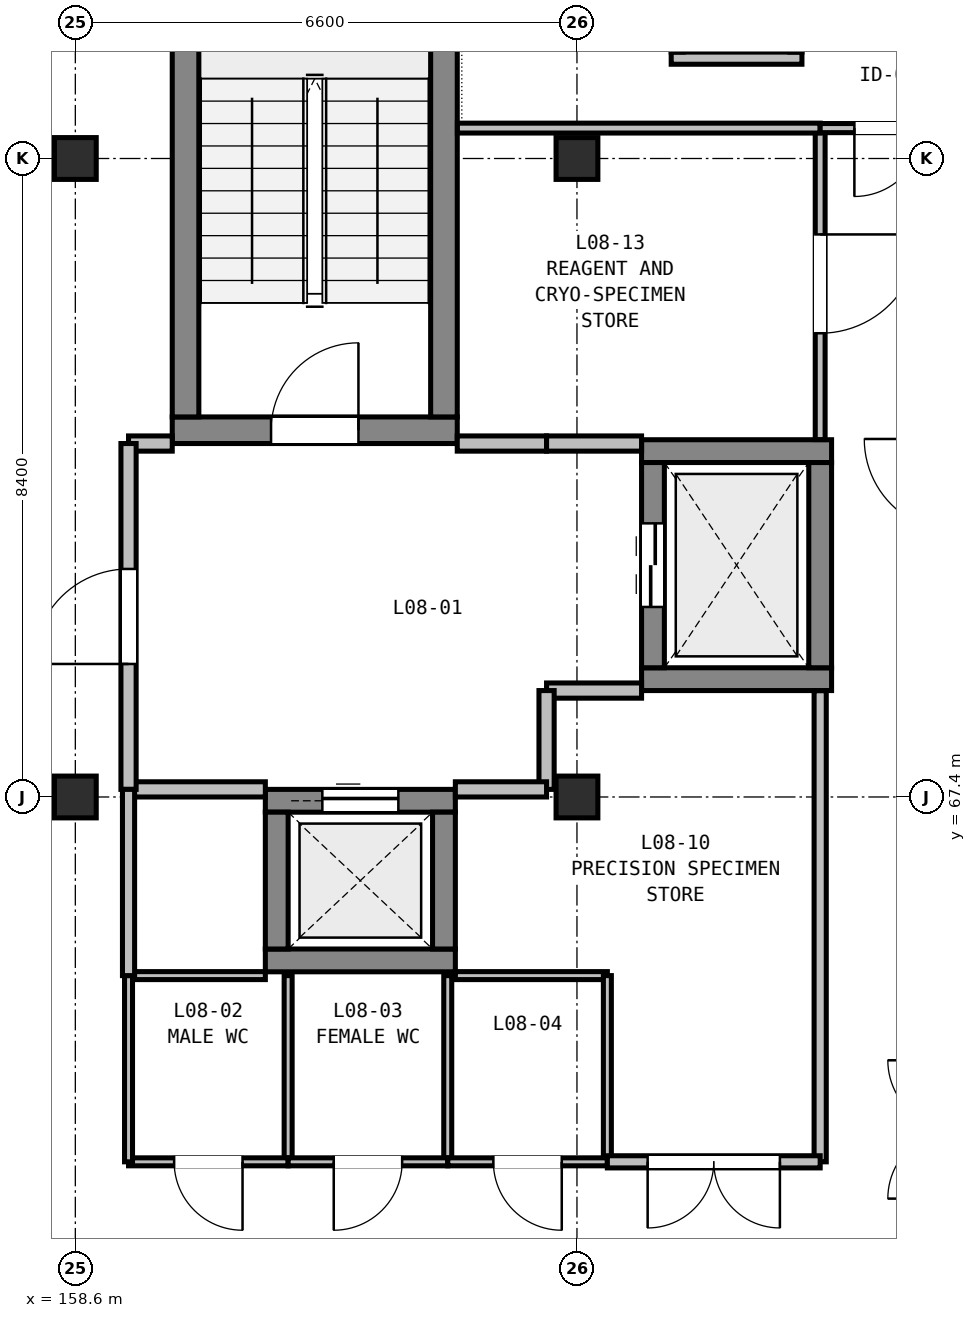
"""IFC4 building model, lengths in metres.
Left out: names, types, materials, properties, quantities, classifications, styles, units other than length and angle.
Written with IfcOpenShell. Run it as: python <this file> out.ifc"""

import sys

from ifc_helpers import new_model, si_unit, direction, frame, frame_2d, origin, origin_2d, place, context, subcontext, project, spatial, rectangle, extrude, element, fill, save


model = new_model("IFC4")
c1 = context("Model", 3, precision=1e-05, world=origin(), true_north=direction((0.0, 1.0)))
c2 = subcontext(c1, "Body", "Model", "MODEL_VIEW")
j1 = project(units=[si_unit("LENGTHUNIT", "METRE"), si_unit("PLANEANGLEUNIT", "RADIAN")], contexts=[c1])
p1 = place(None, origin())
s1 = spatial("IfcSite", under=j1, at=p1, CompositionType="ELEMENT")
p2 = place(p1, origin())
s2 = spatial("IfcBuilding", under=s1, at=p2, CompositionType="ELEMENT")
p3 = place(p2, frame((0.0, 0.0, 36.6)))
s3 = spatial("IfcBuildingStorey", under=s2, at=p3, CompositionType="ELEMENT", Elevation=36.6)
for number, where, z_axis, x_axis in (
    (1, (158.6, 67.4, 0.0), (0.0, 0.0, 1.0), (1.0, 0.0, 0.0)),
    (2, (158.6, 75.8, 0.0), (0.0, 0.0, 1.0), (1.0, 0.0, 0.0)),
    (3, (165.2, 67.4, 0.0), (0.0, 0.0, 1.0), (1.0, 0.0, 0.0)),
    (4, (165.2, 75.8, 0.0), (0.0, 0.0, 1.0), (1.0, 0.0, 0.0)),
):
    element("IfcColumn", number, at=place(p3, frame(where, z_axis=z_axis, x_axis=x_axis)), inside=s3, PredefinedType="COLUMN", context=c2, shape_type="SweptSolid", body=[
        extrude(rectangle(XDim=0.55, YDim=0.55, at=origin_2d()), origin(), (0.0, 0.0, 1.0), 3.9),
    ])
p4 = place(p3, frame((159.875, 72.225, 0.0), z_axis=(0.0, 0.0, 1.0), x_axis=(1.0, 0.0, 0.0)))
e5 = element("IfcWall", 5, at=p4, inside=s3, PredefinedType="SHEAR", context=c2, shape_type="SweptSolid", body=[
    extrude(rectangle(XDim=3.75, YDim=0.35, at=frame_2d((1.875, 0.0))), origin(), (0.0, 0.0, 1.0), 3.9),
])
p5 = place(p4, frame((1.3, 0.0, 0.0)))
e6 = element("IfcOpeningElement", 6, at=p5, cuts=e5, PredefinedType="OPENING", context=c2, shape_type="SweptSolid", body=[
    extrude(rectangle(XDim=1.15, YDim=2.15, at=frame_2d((0.575, 1.075))), frame((0.0, 0.185, 0.0), z_axis=(0.0, -1.0, 0.0), x_axis=(1.0, 0.0, 0.0)), (0.0, 0.0, 1.0), 0.37),
])
for number, where, z_axis, x_axis in (
    (7, (160.05, 72.4, 0.0), (0.0, 0.0, 1.0), (0.0, 1.0, 0.0)),
    (8, (163.45, 72.4, 0.0), (0.0, 0.0, 1.0), (0.0, 1.0, 0.0)),
):
    element("IfcWall", number, at=place(p3, frame(where, z_axis=z_axis, x_axis=x_axis)), inside=s3, PredefinedType="SHEAR", context=c2, shape_type="SweptSolid", body=[
        extrude(rectangle(XDim=7.375, YDim=0.35, at=frame_2d((3.688, 0.0))), origin(), (0.0, 0.0, 1.0), 3.9),
    ])
for number, where, z_axis, x_axis in (
    (9, (166.05, 68.95, 0.0), (0.0, 0.0, 1.0), (1.0, 0.0, 0.0)),
    (10, (166.05, 71.95, 0.0), (0.0, 0.0, 1.0), (1.0, 0.0, 0.0)),
):
    element("IfcWall", number, at=place(p3, frame(where, z_axis=z_axis, x_axis=x_axis)), inside=s3, PredefinedType="SHEAR", context=c2, shape_type="SweptSolid", body=[
        extrude(rectangle(XDim=2.5, YDim=0.3, at=frame_2d((1.25, 0.0))), origin(), (0.0, 0.0, 1.0), 3.9),
    ])
p6 = place(p3, frame((166.2, 69.1, 0.0), z_axis=(0.0, 0.0, 1.0), x_axis=(0.0, 1.0, 0.0)))
e11 = element("IfcWall", 11, at=p6, inside=s3, PredefinedType="SHEAR", context=c2, shape_type="SweptSolid", body=[
    extrude(rectangle(XDim=2.7, YDim=0.3, at=frame_2d((1.35, 0.0))), origin(), (0.0, 0.0, 1.0), 3.9),
])
p7 = place(p6, frame((0.8, 0.0, 0.0)))
e12 = element("IfcOpeningElement", 12, at=p7, cuts=e11, PredefinedType="OPENING", context=c2, shape_type="SweptSolid", body=[
    extrude(rectangle(XDim=1.1, YDim=2.1, at=frame_2d((0.55, 1.05))), frame((0.0, 0.16, 0.0), z_axis=(0.0, -1.0, 0.0), x_axis=(1.0, 0.0, 0.0)), (0.0, 0.0, 1.0), 0.32),
])
p8 = place(p3, frame((168.4, 69.1, 0.0), z_axis=(0.0, 0.0, 1.0), x_axis=(0.0, 1.0, 0.0)))
e13 = element("IfcWall", 13, at=p8, inside=s3, PredefinedType="SHEAR", context=c2, shape_type="SweptSolid", body=[
    extrude(rectangle(XDim=2.7, YDim=0.3, at=frame_2d((1.35, 0.0))), origin(), (0.0, 0.0, 1.0), 3.9),
])
p9 = place(p3, frame((161.1, 65.25, 0.0), z_axis=(0.0, 0.0, 1.0), x_axis=(1.0, 0.0, 0.0)))
e14 = element("IfcWall", 14, at=p9, inside=s3, PredefinedType="SHEAR", context=c2, shape_type="SweptSolid", body=[
    extrude(rectangle(XDim=2.5, YDim=0.3, at=frame_2d((1.25, 0.0))), origin(), (0.0, 0.0, 1.0), 3.9),
])
p10 = place(p3, frame((161.1, 67.35, 0.0), z_axis=(0.0, 0.0, 1.0), x_axis=(1.0, 0.0, 0.0)))
e15 = element("IfcWall", 15, at=p10, inside=s3, PredefinedType="SHEAR", context=c2, shape_type="SweptSolid", body=[
    extrude(rectangle(XDim=2.5, YDim=0.3, at=frame_2d((1.25, 0.0))), origin(), (0.0, 0.0, 1.0), 3.9),
])
p11 = place(p10, frame((0.75, 0.0, 0.0)))
e16 = element("IfcOpeningElement", 16, at=p11, cuts=e15, PredefinedType="OPENING", context=c2, shape_type="SweptSolid", body=[
    extrude(rectangle(XDim=1.0, YDim=2.1, at=frame_2d((0.5, 1.05))), frame((0.0, 0.16, 0.0), z_axis=(0.0, -1.0, 0.0), x_axis=(1.0, 0.0, 0.0)), (0.0, 0.0, 1.0), 0.32),
])
for number, where, z_axis, x_axis in (
    (17, (161.25, 65.4, 0.0), (0.0, 0.0, 1.0), (0.0, 1.0, 0.0)),
    (18, (163.45, 65.4, 0.0), (0.0, 0.0, 1.0), (0.0, 1.0, 0.0)),
):
    element("IfcWall", number, at=place(p3, frame(where, z_axis=z_axis, x_axis=x_axis)), inside=s3, PredefinedType="SHEAR", context=c2, shape_type="SweptSolid", body=[
        extrude(rectangle(XDim=1.8, YDim=0.3, at=frame_2d((0.9, 0.0))), origin(), (0.0, 0.0, 1.0), 3.9),
    ])
p12 = place(p3, frame((166.44, 77.12, 0.0), z_axis=(0.0, 0.0, 1.0), x_axis=(1.0, 0.0, 0.0)))
e19 = element("IfcWall", 19, at=p12, inside=s3, PredefinedType="PARTITIONING", context=c2, shape_type="SweptSolid", body=[
    extrude(rectangle(XDim=1.72, YDim=0.16, at=frame_2d((0.86, 0.0))), origin(), (0.0, 0.0, 1.0), 3.635),
])
p13 = place(p3, frame((159.3, 72.05, 0.0), z_axis=(0.0, 0.0, 1.0), x_axis=(1.0, 0.0, 0.0)))
e20 = element("IfcWall", 20, at=p13, inside=s3, PredefinedType="PARTITIONING", context=c2, shape_type="SweptSolid", body=[
    extrude(rectangle(XDim=0.575, YDim=0.2, at=frame_2d((0.288, 0.0))), origin(), (0.0, 0.0, 1.0), 3.635),
])
p14 = place(p3, frame((163.625, 72.05, 0.0), z_axis=(0.0, 0.0, 1.0), x_axis=(1.0, 0.0, 0.0)))
e21 = element("IfcWall", 21, at=p14, inside=s3, PredefinedType="PARTITIONING", context=c2, shape_type="SweptSolid", body=[
    extrude(rectangle(XDim=1.175, YDim=0.2, at=frame_2d((0.587, 0.0))), origin(), (0.0, 0.0, 1.0), 3.635),
])
for number, where, z_axis, x_axis in (
    (22, (164.8, 72.05, 0.0), (0.0, 0.0, 1.0), (1.0, 0.0, 0.0)),
    (23, (166.05, 68.8, 0.0), (0.0, 0.0, 1.0), (-1.0, 0.0, 0.0)),
):
    element("IfcWall", number, at=place(p3, frame(where, z_axis=z_axis, x_axis=x_axis)), inside=s3, PredefinedType="PARTITIONING", context=c2, shape_type="SweptSolid", body=[
        extrude(rectangle(XDim=1.25, YDim=0.2, at=frame_2d((0.625, 0.0))), origin(), (0.0, 0.0, 1.0), 3.185),
    ])
p15 = place(p3, frame((164.8, 68.8, 0.0), z_axis=(0.0, 0.0, 1.0), x_axis=(0.0, -1.0, 0.0)))
e24 = element("IfcWall", 24, at=p15, inside=s3, PredefinedType="PARTITIONING", context=c2, shape_type="SweptSolid", body=[
    extrude(rectangle(XDim=1.3, YDim=0.2, at=frame_2d((0.65, 0.0))), origin(), (0.0, 0.0, 1.0), 3.285),
])
p16 = place(p3, frame((164.8, 67.5, 0.0), z_axis=(0.0, 0.0, 1.0), x_axis=(-1.0, 0.0, 0.0)))
e25 = element("IfcWall", 25, at=p16, inside=s3, PredefinedType="PARTITIONING", context=c2, shape_type="SweptSolid", body=[
    extrude(rectangle(XDim=1.2, YDim=0.2, at=frame_2d((0.6, 0.0))), origin(), (0.0, 0.0, 1.0), 3.285),
])
p17 = place(p3, frame((161.1, 67.5, 0.0), z_axis=(0.0, 0.0, 1.0), x_axis=(-1.0, 0.0, 0.0)))
e26 = element("IfcWall", 26, at=p17, inside=s3, PredefinedType="PARTITIONING", context=c2, shape_type="SweptSolid", body=[
    extrude(rectangle(XDim=1.8, YDim=0.2, at=frame_2d((0.9, 0.0))), origin(), (0.0, 0.0, 1.0), 3.285),
])
p18 = place(p3, frame((159.3, 67.5, 0.0), z_axis=(0.0, 0.0, 1.0), x_axis=(0.0, 1.0, 0.0)))
e27 = element("IfcWall", 27, at=p18, inside=s3, PredefinedType="PARTITIONING", context=c2, shape_type="SweptSolid", body=[
    extrude(rectangle(XDim=4.55, YDim=0.2, at=frame_2d((2.275, 0.0))), origin(), (0.0, 0.0, 1.0), 3.285),
])
p19 = place(p18, frame((1.65, 0.0, 0.0)))
e28 = element("IfcOpeningElement", 28, at=p19, cuts=e27, PredefinedType="OPENING", context=c2, shape_type="SweptSolid", body=[
    extrude(rectangle(XDim=1.25, YDim=2.15, at=frame_2d((0.625, 1.075))), frame((0.0, 0.11, 0.0), z_axis=(0.0, -1.0, 0.0), x_axis=(1.0, 0.0, 0.0)), (0.0, 0.0, 1.0), 0.22),
])
p20 = place(p3, frame((159.3, 65.05, 0.0), z_axis=(0.0, 0.0, 1.0), x_axis=(1.0, 0.0, 0.0)))
e29 = element("IfcWall", 29, at=p20, inside=s3, PredefinedType="PARTITIONING", context=c2, shape_type="SweptSolid", body=[
    extrude(rectangle(XDim=1.8, YDim=0.105, at=frame_2d((0.9, 0.0))), origin(), (0.0, 0.0, 1.0), 3.635),
])
p21 = place(p3, frame((161.4, 65.05, 0.0), z_axis=(0.0, 0.0, 1.0), x_axis=(0.0, -1.0, 0.0)))
e30 = element("IfcWall", 30, at=p21, inside=s3, PredefinedType="PARTITIONING", context=c2, shape_type="SweptSolid", body=[
    extrude(rectangle(XDim=2.45, YDim=0.105, at=frame_2d((1.225, 0.0))), origin(), (0.0, 0.0, 1.0), 3.635),
])
p22 = place(p3, frame((161.4, 62.6, 0.0), z_axis=(0.0, 0.0, 1.0), x_axis=(-1.0, 0.0, 0.0)))
e31 = element("IfcWall", 31, at=p22, inside=s3, PredefinedType="PARTITIONING", context=c2, shape_type="SweptSolid", body=[
    extrude(rectangle(XDim=2.1, YDim=0.105, at=frame_2d((1.05, 0.0))), origin(), (0.0, 0.0, 1.0), 3.635),
])
p23 = place(p22, frame((0.6, 0.0, 0.0)))
e32 = element("IfcOpeningElement", 32, at=p23, cuts=e31, PredefinedType="OPENING", context=c2, shape_type="SweptSolid", body=[
    extrude(rectangle(XDim=0.9, YDim=2.02, at=frame_2d((0.45, 1.01))), frame((0.0, 0.062, 0.0), z_axis=(0.0, -1.0, 0.0), x_axis=(1.0, 0.0, 0.0)), (0.0, 0.0, 1.0), 0.125),
])
for number, where, z_axis, x_axis in (
    (33, (159.3, 62.6, 0.0), (0.0, 0.0, 1.0), (0.0, 1.0, 0.0)),
    (34, (163.5, 65.05, 0.0), (0.0, 0.0, 1.0), (0.0, -1.0, 0.0)),
):
    element("IfcWall", number, at=place(p3, frame(where, z_axis=z_axis, x_axis=x_axis)), inside=s3, PredefinedType="PARTITIONING", context=c2, shape_type="SweptSolid", body=[
        extrude(rectangle(XDim=2.45, YDim=0.105, at=frame_2d((1.225, 0.0))), origin(), (0.0, 0.0, 1.0), 3.635),
    ])
p24 = place(p3, frame((163.5, 62.6, 0.0), z_axis=(0.0, 0.0, 1.0), x_axis=(-1.0, 0.0, 0.0)))
e35 = element("IfcWall", 35, at=p24, inside=s3, PredefinedType="PARTITIONING", context=c2, shape_type="SweptSolid", body=[
    extrude(rectangle(XDim=2.1, YDim=0.105, at=frame_2d((1.05, 0.0))), origin(), (0.0, 0.0, 1.0), 3.635),
])
p25 = place(p24, frame((0.6, 0.0, 0.0)))
e36 = element("IfcOpeningElement", 36, at=p25, cuts=e35, PredefinedType="OPENING", context=c2, shape_type="SweptSolid", body=[
    extrude(rectangle(XDim=0.9, YDim=2.02, at=frame_2d((0.45, 1.01))), frame((0.0, 0.062, 0.0), z_axis=(0.0, -1.0, 0.0), x_axis=(1.0, 0.0, 0.0)), (0.0, 0.0, 1.0), 0.125),
])
p26 = place(p3, frame((163.6, 65.05, 0.0), z_axis=(0.0, 0.0, 1.0), x_axis=(1.0, 0.0, 0.0)))
e37 = element("IfcWall", 37, at=p26, inside=s3, PredefinedType="PARTITIONING", context=c2, shape_type="SweptSolid", body=[
    extrude(rectangle(XDim=2.0, YDim=0.105, at=frame_2d((1.0, 0.0))), origin(), (0.0, 0.0, 1.0), 3.185),
])
p27 = place(p3, frame((165.6, 65.05, 0.0), z_axis=(0.0, 0.0, 1.0), x_axis=(0.0, -1.0, 0.0)))
e38 = element("IfcWall", 38, at=p27, inside=s3, PredefinedType="PARTITIONING", context=c2, shape_type="SweptSolid", body=[
    extrude(rectangle(XDim=2.45, YDim=0.105, at=frame_2d((1.225, 0.0))), origin(), (0.0, 0.0, 1.0), 3.635),
])
p28 = place(p3, frame((165.6, 62.6, 0.0), z_axis=(0.0, 0.0, 1.0), x_axis=(-1.0, 0.0, 0.0)))
e39 = element("IfcWall", 39, at=p28, inside=s3, PredefinedType="PARTITIONING", context=c2, shape_type="SweptSolid", body=[
    extrude(rectangle(XDim=2.1, YDim=0.105, at=frame_2d((1.05, 0.0))), origin(), (0.0, 0.0, 1.0), 3.185),
])
p29 = place(p28, frame((0.6, 0.0, 0.0)))
e40 = element("IfcOpeningElement", 40, at=p29, cuts=e39, PredefinedType="OPENING", context=c2, shape_type="SweptSolid", body=[
    extrude(rectangle(XDim=0.9, YDim=2.02, at=frame_2d((0.45, 1.01))), frame((0.0, 0.062, 0.0), z_axis=(0.0, -1.0, 0.0), x_axis=(1.0, 0.0, 0.0)), (0.0, 0.0, 1.0), 0.125),
])
p30 = place(p3, frame((168.4, 68.798, 0.0), z_axis=(0.0, 0.0, 1.0), x_axis=(0.0, -1.0, 0.0)))
e41 = element("IfcWall", 41, at=p30, inside=s3, PredefinedType="PARTITIONING", context=c2, shape_type="SweptSolid", body=[
    extrude(rectangle(XDim=6.198, YDim=0.16, at=frame_2d((3.099, 0.0))), origin(), (0.0, 0.0, 1.0), 3.285),
])
p31 = place(p3, frame((168.4, 62.6, 0.0), z_axis=(0.0, 0.0, 1.0), x_axis=(-1.0, 0.0, 0.0)))
e42 = element("IfcWall", 42, at=p31, inside=s3, PredefinedType="PARTITIONING", context=c2, shape_type="SweptSolid", body=[
    extrude(rectangle(XDim=2.8, YDim=0.16, at=frame_2d((1.4, 0.0))), origin(), (0.0, 0.0, 1.0), 3.435),
])
p32 = place(p31, frame((0.53, 0.0, 0.0)))
e43 = element("IfcOpeningElement", 43, at=p32, cuts=e42, PredefinedType="OPENING", context=c2, shape_type="SweptSolid", body=[
    extrude(rectangle(XDim=1.74, YDim=2.2, at=frame_2d((0.87, 1.1))), frame((0.0, 0.09, 0.0), z_axis=(0.0, -1.0, 0.0), x_axis=(1.0, 0.0, 0.0)), (0.0, 0.0, 1.0), 0.18),
])
p33 = place(p3, frame((159.3, 65.05, 0.0), z_axis=(0.0, 0.0, 1.0), x_axis=(0.0, 1.0, 0.0)))
e44 = element("IfcWall", 44, at=p33, inside=s3, PredefinedType="PARTITIONING", context=c2, shape_type="SweptSolid", body=[
    extrude(rectangle(XDim=2.45, YDim=0.16, at=frame_2d((1.225, 0.0))), origin(), (0.0, 0.0, 1.0), 3.285),
])
p34 = place(p3, frame((168.4, 76.2, 0.0), z_axis=(0.0, 0.0, 1.0), x_axis=(0.0, -1.0, 0.0)))
e45 = element("IfcWall", 45, at=p34, inside=s3, PredefinedType="PARTITIONING", context=c2, shape_type="SweptSolid", body=[
    extrude(rectangle(XDim=4.098, YDim=0.13, at=frame_2d((2.049, 0.0))), origin(), (0.0, 0.0, 1.0), 3.285),
])
p35 = place(p34, frame((1.399, 0.0, 0.0)))
e46 = element("IfcOpeningElement", 46, at=p35, cuts=e45, PredefinedType="OPENING", context=c2, shape_type="SweptSolid", body=[
    extrude(rectangle(XDim=1.3, YDim=2.18, at=frame_2d((0.65, 1.09))), frame((0.0, 0.075, 0.0), z_axis=(0.0, -1.0, 0.0), x_axis=(1.0, 0.0, 0.0)), (0.0, 0.0, 1.0), 0.15),
])
p36 = place(p3, frame((163.627, 76.2, 0.0), z_axis=(0.0, 0.0, 1.0), x_axis=(1.0, 0.0, 0.0)))
e47 = element("IfcWall", 47, at=p36, inside=s3, PredefinedType="PARTITIONING", context=c2, shape_type="SweptSolid", body=[
    extrude(rectangle(XDim=4.773, YDim=0.13, at=frame_2d((2.386, 0.0))), origin(), (0.0, 0.0, 1.0), 3.185),
])
p37 = place(p3, frame((170.2, 76.2, 0.0), z_axis=(0.0, 0.0, 1.0), x_axis=(-1.0, 0.0, 0.0)))
e48 = element("IfcWall", 48, at=p37, inside=s3, PredefinedType="PARTITIONING", context=c2, shape_type="SweptSolid", body=[
    extrude(rectangle(XDim=1.8, YDim=0.12, at=frame_2d((0.9, 0.0))), origin(), (0.0, 0.0, 1.0), 3.435),
])
p38 = place(p37, frame((0.45, 0.0, 0.0)))
e49 = element("IfcOpeningElement", 49, at=p38, cuts=e48, PredefinedType="OPENING", context=c2, shape_type="SweptSolid", body=[
    extrude(rectangle(XDim=0.9, YDim=2.02, at=frame_2d((0.45, 1.01))), frame((0.0, 0.07, 0.0), z_axis=(0.0, -1.0, 0.0), x_axis=(1.0, 0.0, 0.0)), (0.0, 0.0, 1.0), 0.14),
])
p39 = place(p5, origin())
e50 = element("IfcDoor", 50, at=p39, inside=s3, OperationType="SINGLE_SWING_RIGHT", PredefinedType="DOOR", context=c2, shape_type="SweptSolid", body=[
    extrude(rectangle(XDim=1.15, YDim=2.15, at=frame_2d((0.575, 1.075))), frame((0.0, 0.025, 0.0), z_axis=(0.0, -1.0, 0.0), x_axis=(1.0, 0.0, 0.0)), (0.0, 0.0, 1.0), 0.05),
])
fill(e6, e50)
p40 = place(p7, origin())
e51 = element("IfcDoor", 51, at=p40, inside=s3, OperationType="DOUBLE_DOOR_SLIDING", PredefinedType="DOOR", context=c2, shape_type="SweptSolid", body=[
    extrude(rectangle(XDim=1.1, YDim=2.1, at=frame_2d((0.55, 1.05))), frame((0.0, 0.025, 0.0), z_axis=(0.0, -1.0, 0.0), x_axis=(1.0, 0.0, 0.0)), (0.0, 0.0, 1.0), 0.05),
])
fill(e12, e51)
p41 = place(p11, origin())
e52 = element("IfcDoor", 52, at=p41, inside=s3, OperationType="SLIDING_TO_LEFT", PredefinedType="DOOR", context=c2, shape_type="SweptSolid", body=[
    extrude(rectangle(XDim=1.0, YDim=2.1, at=frame_2d((0.5, 1.05))), frame((0.0, 0.025, 0.0), z_axis=(0.0, -1.0, 0.0), x_axis=(1.0, 0.0, 0.0)), (0.0, 0.0, 1.0), 0.05),
])
fill(e16, e52)
p42 = place(p19, origin())
e53 = element("IfcDoor", 53, at=p42, inside=s3, OperationType="SINGLE_SWING_LEFT", PredefinedType="DOOR", context=c2, shape_type="SweptSolid", body=[
    extrude(rectangle(XDim=1.25, YDim=2.15, at=frame_2d((0.625, 1.075))), frame((0.0, 0.025, 0.0), z_axis=(0.0, -1.0, 0.0), x_axis=(1.0, 0.0, 0.0)), (0.0, 0.0, 1.0), 0.05),
])
fill(e28, e53)
p43 = place(p23, origin())
e54 = element("IfcDoor", 54, at=p43, inside=s3, OperationType="SINGLE_SWING_LEFT", PredefinedType="DOOR", context=c2, shape_type="SweptSolid", body=[
    extrude(rectangle(XDim=0.9, YDim=2.02, at=frame_2d((0.45, 1.01))), frame((0.0, 0.025, 0.0), z_axis=(0.0, -1.0, 0.0), x_axis=(1.0, 0.0, 0.0)), (0.0, 0.0, 1.0), 0.05),
])
fill(e32, e54)
p44 = place(p25, origin())
e55 = element("IfcDoor", 55, at=p44, inside=s3, OperationType="SINGLE_SWING_RIGHT", PredefinedType="DOOR", context=c2, shape_type="SweptSolid", body=[
    extrude(rectangle(XDim=0.9, YDim=2.02, at=frame_2d((0.45, 1.01))), frame((0.0, 0.025, 0.0), z_axis=(0.0, -1.0, 0.0), x_axis=(1.0, 0.0, 0.0)), (0.0, 0.0, 1.0), 0.05),
])
fill(e36, e55)
p45 = place(p29, origin())
e56 = element("IfcDoor", 56, at=p45, inside=s3, OperationType="SINGLE_SWING_LEFT", PredefinedType="DOOR", context=c2, shape_type="SweptSolid", body=[
    extrude(rectangle(XDim=0.9, YDim=2.02, at=frame_2d((0.45, 1.01))), frame((0.0, 0.025, 0.0), z_axis=(0.0, -1.0, 0.0), x_axis=(1.0, 0.0, 0.0)), (0.0, 0.0, 1.0), 0.05),
])
fill(e40, e56)
p46 = place(p32, origin())
e57 = element("IfcDoor", 57, at=p46, inside=s3, OperationType="DOUBLE_DOOR_SINGLE_SWING", PredefinedType="DOOR", context=c2, shape_type="SweptSolid", body=[
    extrude(rectangle(XDim=1.74, YDim=2.2, at=frame_2d((0.87, 1.1))), frame((0.0, 0.025, 0.0), z_axis=(0.0, -1.0, 0.0), x_axis=(1.0, 0.0, 0.0)), (0.0, 0.0, 1.0), 0.05),
])
fill(e43, e57)
p47 = place(p35, origin())
e58 = element("IfcDoor", 58, at=p47, inside=s3, OperationType="SINGLE_SWING_LEFT", PredefinedType="DOOR", context=c2, shape_type="SweptSolid", body=[
    extrude(rectangle(XDim=1.3, YDim=2.18, at=frame_2d((0.65, 1.09))), frame((0.0, 0.025, 0.0), z_axis=(0.0, -1.0, 0.0), x_axis=(1.0, 0.0, 0.0)), (0.0, 0.0, 1.0), 0.05),
])
fill(e46, e58)
p48 = place(p38, origin())
e59 = element("IfcDoor", 59, at=p48, inside=s3, OperationType="SINGLE_SWING_RIGHT", PredefinedType="DOOR", context=c2, shape_type="SweptSolid", body=[
    extrude(rectangle(XDim=0.9, YDim=2.02, at=frame_2d((0.45, 1.01))), frame((0.0, 0.025, 0.0), z_axis=(0.0, -1.0, 0.0), x_axis=(1.0, 0.0, 0.0)), (0.0, 0.0, 1.0), 0.05),
])
fill(e49, e59)
save(model, sys.argv[1])
